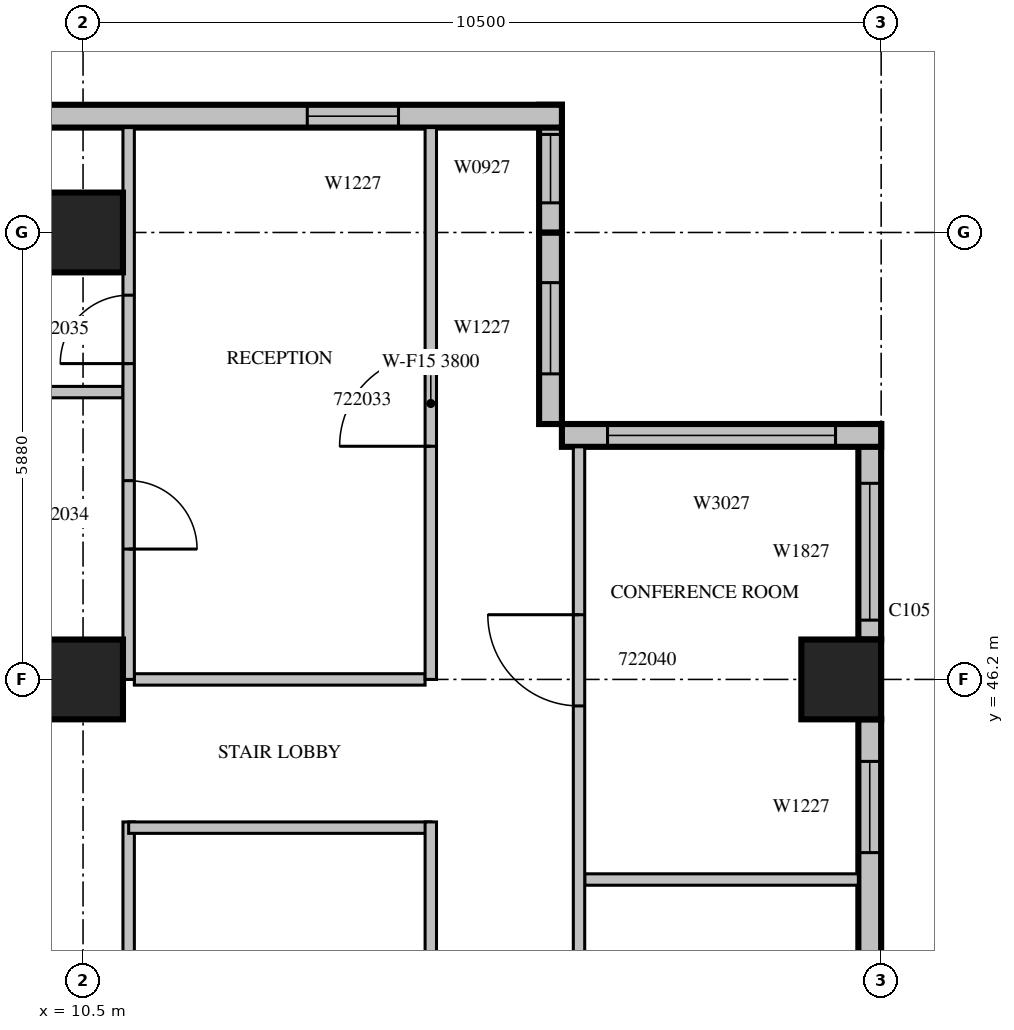
"""IFC4 building model, lengths in metres.
Left out: names, types, materials, properties, quantities, classifications, styles, units other than length and angle.
Written with IfcOpenShell. Run it as: python <this file> out.ifc"""

import sys

from ifc_helpers import new_model, si_unit, direction, frame, frame_2d, origin, origin_2d, place, context, subcontext, project, spatial, rectangle, extrude, source, transform, mapped, element, fill, save


model = new_model("IFC4")
c1 = context("Model", 3, precision=1e-05, world=origin(), true_north=direction((0.0, 1.0)))
c2 = subcontext(c1, "Body", "Model", "MODEL_VIEW")
j1 = project(units=[si_unit("LENGTHUNIT", "METRE"), si_unit("PLANEANGLEUNIT", "RADIAN")], contexts=[c1])
p1 = place(None, origin())
s1 = spatial("IfcSite", under=j1, at=p1, CompositionType="ELEMENT")
p2 = place(p1, origin())
s2 = spatial("IfcBuilding", under=s1, at=p2, CompositionType="ELEMENT")
p3 = place(p2, frame((0.0, 0.0, 103.5)))
s3 = spatial("IfcBuildingStorey", under=s2, at=p3, CompositionType="ELEMENT", Elevation=103.5)
m1 = source(origin(), c2, "Body", "SweptSolid", [
    extrude(rectangle(XDim=1.05, YDim=1.05, at=origin_2d()), origin(), (0.0, 0.0, 1.0), 4.2),
])
for number, where, z_axis, x_axis in (
    (1, (10.5, 46.2, 0.0), (0.0, 0.0, 1.0), (1.0, 0.0, 0.0)),
    (2, (20.475, 46.2, 0.0), (0.0, 0.0, 1.0), (1.0, 0.0, 0.0)),
    (3, (10.5, 52.08, 0.0), (0.0, 0.0, 1.0), (1.0, 0.0, 0.0)),
):
    element("IfcColumn", number, at=place(p3, frame(where, z_axis=z_axis, x_axis=x_axis)), inside=s3, PredefinedType="COLUMN", context=c2, shape_type="MappedRepresentation", body=[
        mapped(m1, transform((0.0, 0.0, 0.0), scale=1.0)),
    ])
m2 = source(origin(), c2, "Body", "SweptSolid", [
    extrude(rectangle(XDim=7.35, YDim=0.3, at=frame_2d((3.675, 0.0))), origin(), (0.0, 0.0, 1.0), 3.8),
])
p4 = place(p3, frame((20.85, 38.325, 0.0), z_axis=(0.0, 0.0, 1.0), x_axis=(0.0, 1.0, 0.0)))
e4 = element("IfcWall", 4, at=p4, inside=s3, PredefinedType="STANDARD", context=c2, shape_type="MappedRepresentation", body=[
    mapped(m2, transform((0.0, 0.0, 0.0), scale=1.0)),
])
m3 = source(origin(), c2, "Body", "SweptSolid", [
    extrude(rectangle(XDim=2.4, YDim=2.7, at=frame_2d((1.2, 1.35))), frame((0.0, 0.16, 0.0), z_axis=(0.0, -1.0, 0.0), x_axis=(1.0, 0.0, 0.0)), (0.0, 0.0, 1.0), 0.32),
])
p5 = place(p4, frame((0.375, 0.0, 0.6)))
e5 = element("IfcOpeningElement", 5, at=p5, cuts=e4, PredefinedType="OPENING", context=c2, shape_type="MappedRepresentation", body=[
    mapped(m3, transform((0.0, 0.0, 0.0), scale=1.0)),
])
m4 = source(origin(), c2, "Body", "SweptSolid", [
    extrude(rectangle(XDim=1.2, YDim=2.7, at=frame_2d((0.6, 1.35))), frame((0.0, 0.16, 0.0), z_axis=(0.0, -1.0, 0.0), x_axis=(1.0, 0.0, 0.0)), (0.0, 0.0, 1.0), 0.32),
])
p6 = place(p4, frame((5.596, 0.0, 0.6)))
e6 = element("IfcOpeningElement", 6, at=p6, cuts=e4, PredefinedType="OPENING", context=c2, shape_type="MappedRepresentation", body=[
    mapped(m4, transform((0.0, 0.0, 0.0), scale=1.0)),
])
m5 = source(origin(), c2, "Body", "SweptSolid", [
    extrude(rectangle(XDim=2.835, YDim=0.3, at=frame_2d((1.417, 0.0))), origin(), (0.0, 0.0, 1.0), 3.8),
])
p7 = place(p3, frame((20.85, 46.725, 0.0), z_axis=(0.0, 0.0, 1.0), x_axis=(0.0, 1.0, 0.0)))
e7 = element("IfcWall", 7, at=p7, inside=s3, PredefinedType="STANDARD", context=c2, shape_type="MappedRepresentation", body=[
    mapped(m5, transform((0.0, 0.0, 0.0), scale=1.0)),
])
m6 = source(origin(), c2, "Body", "SweptSolid", [
    extrude(rectangle(XDim=1.8, YDim=2.7, at=frame_2d((0.9, 1.35))), frame((0.0, 0.16, 0.0), z_axis=(0.0, -1.0, 0.0), x_axis=(1.0, 0.0, 0.0)), (0.0, 0.0, 1.0), 0.32),
])
p8 = place(p7, frame((0.255, 0.0, 0.6)))
e8 = element("IfcOpeningElement", 8, at=p8, cuts=e7, PredefinedType="OPENING", context=c2, shape_type="MappedRepresentation", body=[
    mapped(m6, transform((0.0, 0.0, 0.0), scale=1.0)),
])
m7 = source(origin(), c2, "Body", "SweptSolid", [
    extrude(rectangle(XDim=4.2, YDim=0.3, at=frame_2d((2.1, 0.0))), origin(), (0.0, 0.0, 1.0), 3.8),
])
p9 = place(p3, frame((21.0, 49.41, 0.0), z_axis=(0.0, 0.0, 1.0), x_axis=(-1.0, 0.0, 0.0)))
e9 = element("IfcWall", 9, at=p9, inside=s3, PredefinedType="STANDARD", context=c2, shape_type="MappedRepresentation", body=[
    mapped(m7, transform((0.0, 0.0, 0.0), scale=1.0)),
])
m8 = source(origin(), c2, "Body", "SweptSolid", [
    extrude(rectangle(XDim=3.0, YDim=2.7, at=frame_2d((1.5, 1.35))), frame((0.0, 0.16, 0.0), z_axis=(0.0, -1.0, 0.0), x_axis=(1.0, 0.0, 0.0)), (0.0, 0.0, 1.0), 0.32),
])
p10 = place(p9, frame((0.6, 0.0, 0.6)))
e10 = element("IfcOpeningElement", 10, at=p10, cuts=e9, PredefinedType="OPENING", context=c2, shape_type="MappedRepresentation", body=[
    mapped(m8, transform((0.0, 0.0, 0.0), scale=1.0)),
])
m9 = source(origin(), c2, "Body", "SweptSolid", [
    extrude(rectangle(XDim=2.52, YDim=0.3, at=frame_2d((1.26, 0.0))), origin(), (0.0, 0.0, 1.0), 3.8),
])
p11 = place(p3, frame((16.65, 49.56, 0.0), z_axis=(0.0, 0.0, 1.0), x_axis=(0.0, 1.0, 0.0)))
e11 = element("IfcWall", 11, at=p11, inside=s3, PredefinedType="STANDARD", context=c2, shape_type="MappedRepresentation", body=[
    mapped(m9, transform((0.0, 0.0, 0.0), scale=1.0)),
])
p12 = place(p11, frame((0.66, 0.0, 0.6)))
e12 = element("IfcOpeningElement", 12, at=p12, cuts=e11, PredefinedType="OPENING", context=c2, shape_type="MappedRepresentation", body=[
    mapped(m4, transform((0.0, 0.0, 0.0), scale=1.0)),
])
m10 = source(origin(), c2, "Body", "SweptSolid", [
    extrude(rectangle(XDim=1.68, YDim=0.3, at=frame_2d((0.84, 0.0))), origin(), (0.0, 0.0, 1.0), 3.8),
])
p13 = place(p3, frame((16.65, 52.08, 0.0), z_axis=(0.0, 0.0, 1.0), x_axis=(0.0, 1.0, 0.0)))
e13 = element("IfcWall", 13, at=p13, inside=s3, PredefinedType="STANDARD", context=c2, shape_type="MappedRepresentation", body=[
    mapped(m10, transform((0.0, 0.0, 0.0), scale=1.0)),
])
m11 = source(origin(), c2, "Body", "SweptSolid", [
    extrude(rectangle(XDim=0.9, YDim=2.7, at=frame_2d((0.45, 1.35))), frame((0.0, 0.16, 0.0), z_axis=(0.0, -1.0, 0.0), x_axis=(1.0, 0.0, 0.0)), (0.0, 0.0, 1.0), 0.32),
])
p14 = place(p13, frame((0.39, 0.0, 0.6)))
e14 = element("IfcOpeningElement", 14, at=p14, cuts=e13, PredefinedType="OPENING", context=c2, shape_type="MappedRepresentation", body=[
    mapped(m11, transform((0.0, 0.0, 0.0), scale=1.0)),
])
m12 = source(origin(), c2, "Body", "SweptSolid", [
    extrude(rectangle(XDim=10.5, YDim=0.3, at=frame_2d((5.25, 0.0))), origin(), (0.0, 0.0, 1.0), 3.8),
])
p15 = place(p3, frame((16.8, 53.61, 0.0), z_axis=(0.0, 0.0, 1.0), x_axis=(-1.0, 0.0, 0.0)))
e15 = element("IfcWall", 15, at=p15, inside=s3, PredefinedType="STANDARD", context=c2, shape_type="MappedRepresentation", body=[
    mapped(m12, transform((0.0, 0.0, 0.0), scale=1.0)),
])
p16 = place(p15, frame((2.15, 0.0, 0.6)))
e16 = element("IfcOpeningElement", 16, at=p16, cuts=e15, PredefinedType="OPENING", context=c2, shape_type="MappedRepresentation", body=[
    mapped(m4, transform((0.0, 0.0, 0.0), scale=1.0)),
])
p17 = place(p15, frame((8.025, 0.0, 0.6)))
e17 = element("IfcOpeningElement", 17, at=p17, cuts=e15, PredefinedType="OPENING", context=c2, shape_type="MappedRepresentation", body=[
    mapped(m6, transform((0.0, 0.0, 0.0), scale=1.0)),
])
m13 = source(origin(), c2, "Body", "SweptSolid", [
    extrude(rectangle(XDim=6.45, YDim=0.15, at=frame_2d((3.225, 0.0))), origin(), (0.0, 0.0, 1.0), 3.8),
])
p18 = place(p3, frame((11.1, 44.325, 0.0), z_axis=(0.0, 0.0, 1.0), x_axis=(0.0, -1.0, 0.0)))
e18 = element("IfcWall", 18, at=p18, inside=s3, PredefinedType="PARTITIONING", context=c2, shape_type="MappedRepresentation", body=[
    mapped(m13, transform((0.0, 0.0, 0.0), scale=1.0)),
])
m14 = source(origin(), c2, "Body", "SweptSolid", [
    extrude(rectangle(XDim=3.975, YDim=0.15, at=frame_2d((1.988, 0.0))), origin(), (0.0, 0.0, 1.0), 3.8),
])
p19 = place(p3, frame((15.075, 44.25, 0.0), z_axis=(0.0, 0.0, 1.0), x_axis=(-1.0, 0.0, 0.0)))
e19 = element("IfcWall", 19, at=p19, inside=s3, PredefinedType="PARTITIONING", context=c2, shape_type="MappedRepresentation", body=[
    mapped(m14, transform((0.0, 0.0, 0.0), scale=1.0)),
])
p20 = place(p3, frame((15.075, 37.875, 0.0), z_axis=(0.0, 0.0, 1.0), x_axis=(0.0, 1.0, 0.0)))
e20 = element("IfcWall", 20, at=p20, inside=s3, PredefinedType="PARTITIONING", context=c2, shape_type="MappedRepresentation", body=[
    mapped(m13, transform((0.0, 0.0, 0.0), scale=1.0)),
])
m15 = source(origin(), c2, "Body", "SweptSolid", [
    extrude(rectangle(XDim=0.9, YDim=2.1, at=frame_2d((0.45, 1.05))), frame((0.0, 0.085, 0.0), z_axis=(0.0, -1.0, 0.0), x_axis=(1.0, 0.0, 0.0)), (0.0, 0.0, 1.0), 0.17),
])
p21 = place(p20, frame((2.737, 0.0, 0.0)))
e21 = element("IfcOpeningElement", 21, at=p21, cuts=e20, PredefinedType="OPENING", context=c2, shape_type="MappedRepresentation", body=[
    mapped(m15, transform((0.0, 0.0, 0.0), scale=1.0)),
])
p22 = place(p3, frame((11.025, 49.98, 0.0), z_axis=(0.0, 0.0, 1.0), x_axis=(-1.0, 0.0, 0.0)))
e22 = element("IfcWall", 22, at=p22, inside=s3, PredefinedType="PARTITIONING", context=c2, shape_type="SweptSolid", body=[
    extrude(rectangle(XDim=4.52, YDim=0.15, at=frame_2d((2.26, 0.0))), origin(), (0.0, 0.0, 1.0), 3.8),
])
m16 = source(origin(), c2, "Body", "SweptSolid", [
    extrude(rectangle(XDim=3.825, YDim=0.15, at=frame_2d((1.913, 0.0))), origin(), (0.0, 0.0, 1.0), 3.8),
])
p23 = place(p3, frame((15.0, 46.2, 0.0), z_axis=(0.0, 0.0, 1.0), x_axis=(-1.0, 0.0, 0.0)))
e23 = element("IfcWall", 23, at=p23, inside=s3, PredefinedType="PARTITIONING", context=c2, shape_type="MappedRepresentation", body=[
    mapped(m16, transform((0.0, 0.0, 0.0), scale=1.0)),
])
m17 = source(origin(), c2, "Body", "SweptSolid", [
    extrude(rectangle(XDim=7.26, YDim=0.15, at=frame_2d((3.63, 0.0))), origin(), (0.0, 0.0, 1.0), 3.8),
])
p24 = place(p3, frame((11.1, 46.2, 0.0), z_axis=(0.0, 0.0, 1.0), x_axis=(0.0, 1.0, 0.0)))
e24 = element("IfcWall", 24, at=p24, inside=s3, PredefinedType="PARTITIONING", context=c2, shape_type="MappedRepresentation", body=[
    mapped(m17, transform((0.0, 0.0, 0.0), scale=1.0)),
])
p25 = place(p24, frame((1.715, 0.0, 0.0)))
e25 = element("IfcOpeningElement", 25, at=p25, cuts=e24, PredefinedType="OPENING", context=c2, shape_type="MappedRepresentation", body=[
    mapped(m15, transform((0.0, 0.0, 0.0), scale=1.0)),
])
p26 = place(p24, frame((4.155, 0.0, 0.0)))
e26 = element("IfcOpeningElement", 26, at=p26, cuts=e24, PredefinedType="OPENING", context=c2, shape_type="MappedRepresentation", body=[
    mapped(m15, transform((0.0, 0.0, 0.0), scale=1.0)),
])
m18 = source(origin(), c2, "Body", "SweptSolid", [
    extrude(rectangle(XDim=3.6, YDim=0.15, at=frame_2d((1.8, 0.0))), origin(), (0.0, 0.0, 1.0), 3.8),
])
p27 = place(p3, frame((17.1, 43.568, 0.0), z_axis=(0.0, 0.0, 1.0), x_axis=(1.0, 0.0, 0.0)))
e27 = element("IfcWall", 27, at=p27, inside=s3, PredefinedType="PARTITIONING", context=c2, shape_type="MappedRepresentation", body=[
    mapped(m18, transform((0.0, 0.0, 0.0), scale=1.0)),
])
p28 = place(p3, frame((15.075, 46.2, 0.0), z_axis=(0.0, 0.0, 1.0), x_axis=(0.0, 1.0, 0.0)))
e28 = element("IfcWall", 28, at=p28, inside=s3, PredefinedType="PARTITIONING", context=c2, shape_type="MappedRepresentation", body=[
    mapped(m17, transform((0.0, 0.0, 0.0), scale=1.0)),
])
m19 = source(origin(), c2, "Body", "SweptSolid", [
    extrude(rectangle(XDim=1.2, YDim=2.1, at=frame_2d((0.6, 1.05))), frame((0.0, 0.085, 0.0), z_axis=(0.0, -1.0, 0.0), x_axis=(1.0, 0.0, 0.0)), (0.0, 0.0, 1.0), 0.17),
])
p29 = place(p28, frame((3.067, 0.0, 0.0)))
e29 = element("IfcOpeningElement", 29, at=p29, cuts=e28, PredefinedType="OPENING", context=c2, shape_type="MappedRepresentation", body=[
    mapped(m19, transform((0.0, 0.0, 0.0), scale=1.0)),
])
p30 = place(p3, frame((17.025, 49.26, 0.0), z_axis=(0.0, 0.0, 1.0), x_axis=(0.0, -1.0, 0.0)))
e30 = element("IfcWall", 30, at=p30, inside=s3, PredefinedType="PARTITIONING", context=c2, shape_type="SweptSolid", body=[
    extrude(rectangle(XDim=19.86, YDim=0.15, at=frame_2d((9.93, 0.0))), origin(), (0.0, 0.0, 1.0), 3.3),
])
m20 = source(origin(), c2, "Body", "SweptSolid", [
    extrude(rectangle(XDim=1.0, YDim=2.1, at=frame_2d((0.5, 1.05))), frame((0.0, 0.085, 0.0), z_axis=(0.0, -1.0, 0.0), x_axis=(1.0, 0.0, 0.0)), (0.0, 0.0, 1.0), 0.17),
])
p31 = place(p30, frame((17.503, 0.0, 0.0)))
e31 = element("IfcOpeningElement", 31, at=p31, cuts=e30, PredefinedType="OPENING", context=c2, shape_type="MappedRepresentation", body=[
    mapped(m20, transform((0.0, 0.0, 0.0), scale=1.0)),
])
p32 = place(p30, frame((14.191, 0.0, 0.0)))
e32 = element("IfcOpeningElement", 32, at=p32, cuts=e30, PredefinedType="OPENING", context=c2, shape_type="MappedRepresentation", body=[
    mapped(m20, transform((0.0, 0.0, 0.0), scale=1.0)),
])
p33 = place(p30, frame((11.848, 0.0, 0.0)))
e33 = element("IfcOpeningElement", 33, at=p33, cuts=e30, PredefinedType="OPENING", context=c2, shape_type="MappedRepresentation", body=[
    mapped(m20, transform((0.0, 0.0, 0.0), scale=1.0)),
])
p34 = place(p30, frame((7.976, 0.0, 0.0)))
e34 = element("IfcOpeningElement", 34, at=p34, cuts=e30, PredefinedType="OPENING", context=c2, shape_type="MappedRepresentation", body=[
    mapped(m19, transform((0.0, 0.0, 0.0), scale=1.0)),
])
p35 = place(p30, frame((2.209, 0.0, 0.0)))
e35 = element("IfcOpeningElement", 35, at=p35, cuts=e30, PredefinedType="OPENING", context=c2, shape_type="MappedRepresentation", body=[
    mapped(m19, transform((0.0, 0.0, 0.0), scale=1.0)),
])
m21 = source(origin(), c2, "Body", "SweptSolid", [
    extrude(rectangle(XDim=1.2, YDim=2.7, at=frame_2d((0.6, 1.35))), frame((0.0, 0.03, 0.0), z_axis=(0.0, -1.0, 0.0), x_axis=(1.0, 0.0, 0.0)), (0.0, 0.0, 1.0), 0.06),
])
p36 = place(p6, origin())
e36 = element("IfcWindow", 36, at=p36, inside=s3, PartitioningType="SINGLE_PANEL", PredefinedType="WINDOW", context=c2, shape_type="MappedRepresentation", body=[
    mapped(m21, transform((0.0, 0.0, 0.0), scale=1.0)),
])
fill(e6, e36)
m22 = source(origin(), c2, "Body", "SweptSolid", [
    extrude(rectangle(XDim=1.8, YDim=2.7, at=frame_2d((0.9, 1.35))), frame((0.0, 0.03, 0.0), z_axis=(0.0, -1.0, 0.0), x_axis=(1.0, 0.0, 0.0)), (0.0, 0.0, 1.0), 0.06),
])
p37 = place(p8, origin())
e37 = element("IfcWindow", 37, at=p37, inside=s3, PartitioningType="SINGLE_PANEL", PredefinedType="WINDOW", context=c2, shape_type="MappedRepresentation", body=[
    mapped(m22, transform((0.0, 0.0, 0.0), scale=1.0)),
])
fill(e8, e37)
m23 = source(origin(), c2, "Body", "SweptSolid", [
    extrude(rectangle(XDim=3.0, YDim=2.7, at=frame_2d((1.5, 1.35))), frame((0.0, 0.03, 0.0), z_axis=(0.0, -1.0, 0.0), x_axis=(1.0, 0.0, 0.0)), (0.0, 0.0, 1.0), 0.06),
])
p38 = place(p10, origin())
e38 = element("IfcWindow", 38, at=p38, inside=s3, PartitioningType="SINGLE_PANEL", PredefinedType="WINDOW", context=c2, shape_type="MappedRepresentation", body=[
    mapped(m23, transform((0.0, 0.0, 0.0), scale=1.0)),
])
fill(e10, e38)
p39 = place(p12, origin())
e39 = element("IfcWindow", 39, at=p39, inside=s3, PartitioningType="SINGLE_PANEL", PredefinedType="WINDOW", context=c2, shape_type="MappedRepresentation", body=[
    mapped(m21, transform((0.0, 0.0, 0.0), scale=1.0)),
])
fill(e12, e39)
m24 = source(origin(), c2, "Body", "SweptSolid", [
    extrude(rectangle(XDim=0.9, YDim=2.7, at=frame_2d((0.45, 1.35))), frame((0.0, 0.03, 0.0), z_axis=(0.0, -1.0, 0.0), x_axis=(1.0, 0.0, 0.0)), (0.0, 0.0, 1.0), 0.06),
])
p40 = place(p14, origin())
e40 = element("IfcWindow", 40, at=p40, inside=s3, PartitioningType="SINGLE_PANEL", PredefinedType="WINDOW", context=c2, shape_type="MappedRepresentation", body=[
    mapped(m24, transform((0.0, 0.0, 0.0), scale=1.0)),
])
fill(e14, e40)
p41 = place(p16, origin())
e41 = element("IfcWindow", 41, at=p41, inside=s3, PartitioningType="SINGLE_PANEL", PredefinedType="WINDOW", context=c2, shape_type="MappedRepresentation", body=[
    mapped(m21, transform((0.0, 0.0, 0.0), scale=1.0)),
])
fill(e16, e41)
m25 = source(origin(), c2, "Body", "SweptSolid", [
    extrude(rectangle(XDim=1.2, YDim=2.1, at=frame_2d((0.6, 1.05))), frame((0.0, 0.025, 0.0), z_axis=(0.0, -1.0, 0.0), x_axis=(1.0, 0.0, 0.0)), (0.0, 0.0, 1.0), 0.05),
])
p42 = place(p29, origin())
e42 = element("IfcDoor", 42, at=p42, inside=s3, OperationType="SINGLE_SWING_LEFT", PredefinedType="DOOR", context=c2, shape_type="MappedRepresentation", body=[
    mapped(m25, transform((0.0, 0.0, 0.0), scale=1.0)),
])
fill(e29, e42)
m26 = source(origin(), c2, "Body", "SweptSolid", [
    extrude(rectangle(XDim=0.9, YDim=2.1, at=frame_2d((0.45, 1.05))), frame((0.0, 0.025, 0.0), z_axis=(0.0, -1.0, 0.0), x_axis=(1.0, 0.0, 0.0)), (0.0, 0.0, 1.0), 0.05),
])
p43 = place(p25, origin())
e43 = element("IfcDoor", 43, at=p43, inside=s3, OperationType="SINGLE_SWING_RIGHT", PredefinedType="DOOR", context=c2, shape_type="MappedRepresentation", body=[
    mapped(m26, transform((0.0, 0.0, 0.0), scale=1.0)),
])
fill(e25, e43)
p44 = place(p26, origin())
e44 = element("IfcDoor", 44, at=p44, inside=s3, OperationType="SINGLE_SWING_LEFT", PredefinedType="DOOR", context=c2, shape_type="MappedRepresentation", body=[
    mapped(m26, transform((0.0, 0.0, 0.0), scale=1.0)),
])
fill(e26, e44)
p45 = place(p35, origin())
e45 = element("IfcDoor", 45, at=p45, inside=s3, OperationType="SINGLE_SWING_RIGHT", PredefinedType="DOOR", context=c2, shape_type="MappedRepresentation", body=[
    mapped(m25, transform((0.0, 0.0, 0.0), scale=1.0)),
])
fill(e35, e45)
save(model, sys.argv[1])
